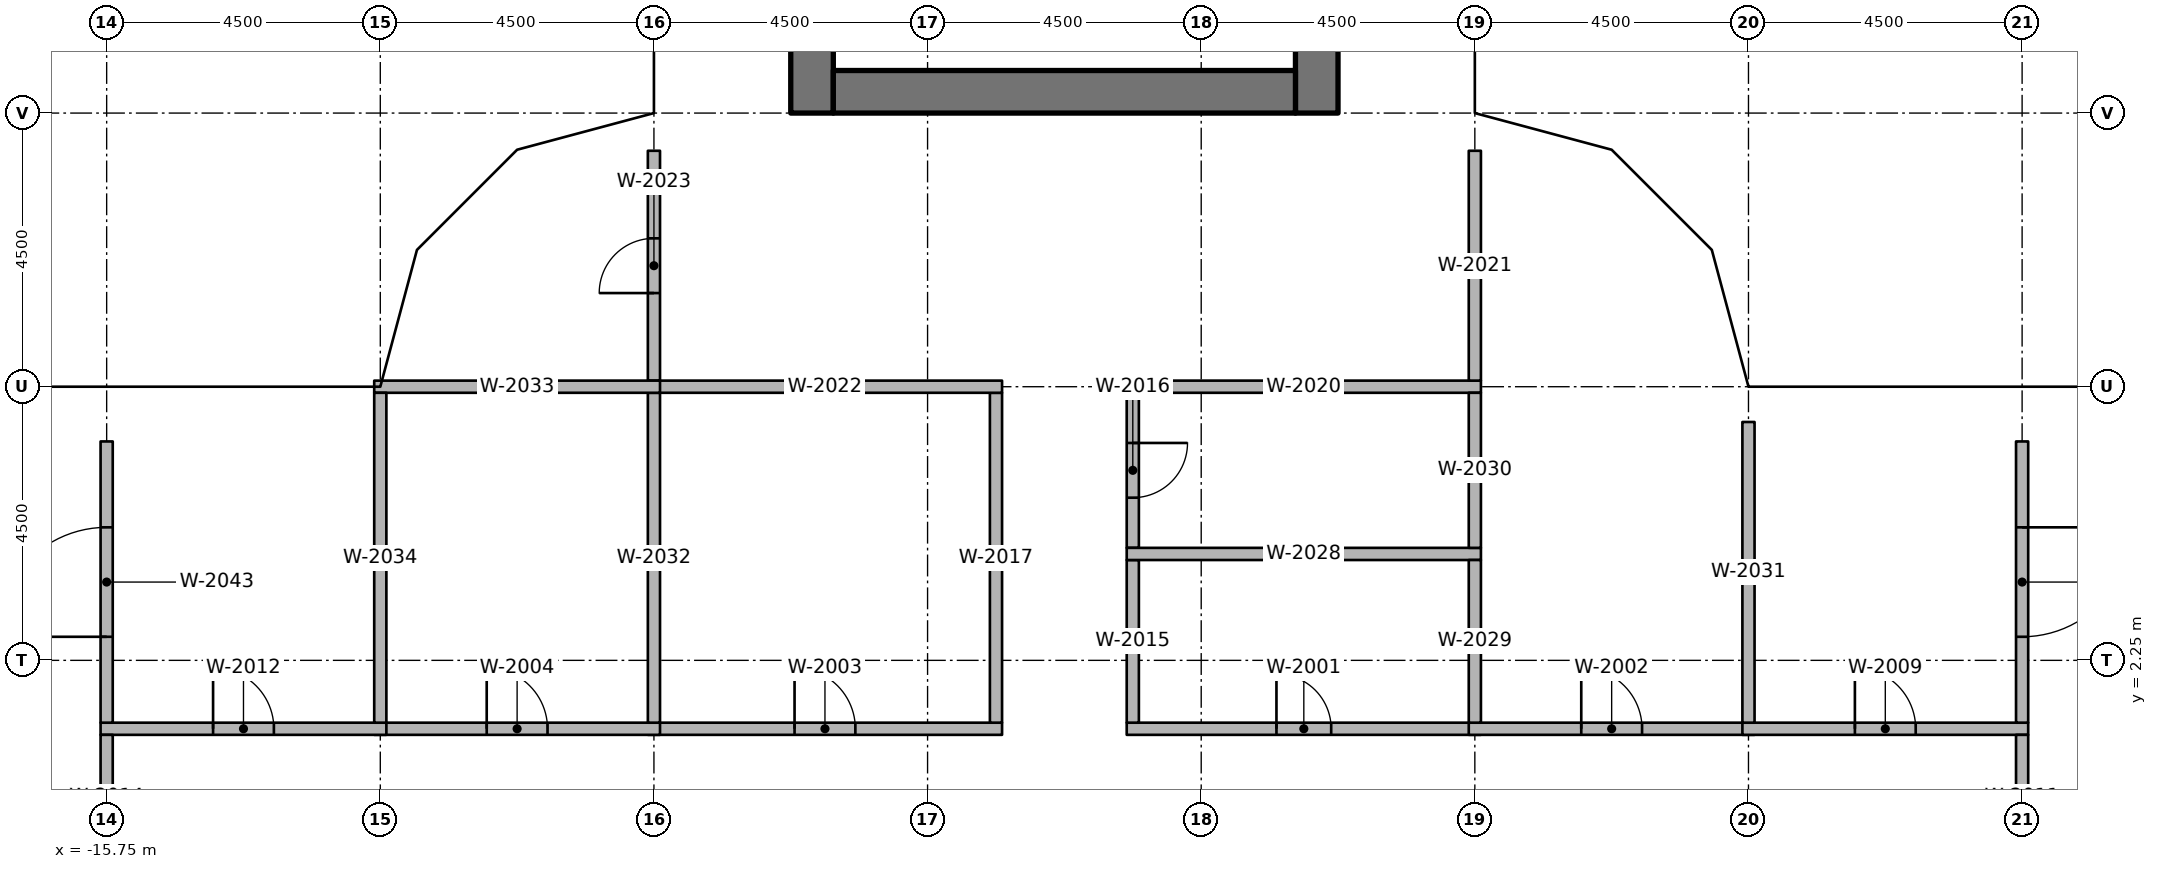
"""IFC4 building model, lengths in metres.
Left out: names, types, materials, properties, quantities, classifications, styles, units other than length and angle.
Written with IfcOpenShell. Run it as: python <this file> out.ifc"""

import sys

from ifc_helpers import new_model, si_unit, direction, frame, frame_2d, origin, origin_2d, place, context, subcontext, project, spatial, rectangle, extrude, element, fill, save


model = new_model("IFC4")
c1 = context("Model", 3, precision=1e-05, world=origin(), true_north=direction((0.0, 1.0)))
c2 = subcontext(c1, "Body", "Model", "MODEL_VIEW")
j1 = project(units=[si_unit("LENGTHUNIT", "METRE"), si_unit("PLANEANGLEUNIT", "RADIAN")], contexts=[c1])
p1 = place(None, origin())
s1 = spatial("IfcSite", under=j1, at=p1, CompositionType="ELEMENT")
p2 = place(p1, origin())
s2 = spatial("IfcBuilding", under=s1, at=p2, CompositionType="ELEMENT")
p3 = place(p2, frame((0.0, 0.0, 186.6)))
s3 = spatial("IfcBuildingStorey", under=s2, at=p3, CompositionType="ELEMENT", Elevation=186.6)
for number, where, z_axis, x_axis in (
    (1, (-15.75, 6.25, 0.0), (0.0, 0.0, 1.0), (1.0, 0.0, 0.0)),
    (2, (-10.75, 6.25, 0.0), (0.0, 0.0, 1.0), (1.0, 0.0, 0.0)),
    (3, (-6.25, 6.25, 0.0), (0.0, 0.0, 1.0), (1.0, 0.0, 0.0)),
    (4, (-6.25, 10.75, 0.0), (0.0, 0.0, 1.0), (1.0, 0.0, 0.0)),
    (5, (6.25, 6.25, 0.0), (0.0, 0.0, 1.0), (1.0, 0.0, 0.0)),
    (6, (6.25, 10.75, 0.0), (0.0, 0.0, 1.0), (1.0, 0.0, 0.0)),
    (7, (10.75, 6.25, 0.0), (0.0, 0.0, 1.0), (1.0, 0.0, 0.0)),
    (8, (15.75, 6.25, 0.0), (0.0, 0.0, 1.0), (1.0, 0.0, 0.0)),
):
    element("IfcColumn", number, at=place(p3, frame(where, z_axis=z_axis, x_axis=x_axis)), inside=s3, PredefinedType="COLUMN", context=c2, shape_type="SweptSolid", body=[
        extrude(rectangle(XDim=0.8, YDim=0.8, at=origin_2d()), origin(), (0.0, 0.0, 1.0), 3.65),
    ])
p4 = place(p3, frame((-4.15, 11.25, 0.0), z_axis=(0.0, 0.0, 1.0), x_axis=(0.0, 1.0, 0.0)))
e9 = element("IfcWall", 9, at=p4, inside=s3, PredefinedType="SHEAR", context=c2, shape_type="SweptSolid", body=[
    extrude(rectangle(XDim=15.0, YDim=0.7, at=frame_2d((7.5, 0.0))), origin(), (0.0, 0.0, 1.0), 3.8),
])
p5 = place(p4, frame((7.15, 0.0, 0.0)))
e10 = element("IfcOpeningElement", 10, at=p5, cuts=e9, PredefinedType="OPENING", context=c2, shape_type="SweptSolid", body=[
    extrude(rectangle(XDim=1.5, YDim=2.3, at=frame_2d((0.75, 1.15))), frame((0.0, 0.36, 0.0), z_axis=(0.0, -1.0, 0.0), x_axis=(1.0, 0.0, 0.0)), (0.0, 0.0, 1.0), 0.72),
])
p6 = place(p4, frame((13.9, 0.0, 0.0)))
e11 = element("IfcOpeningElement", 11, at=p6, cuts=e9, PredefinedType="OPENING", context=c2, shape_type="SweptSolid", body=[
    extrude(rectangle(XDim=0.9, YDim=2.1, at=frame_2d((0.45, 1.05))), frame((0.0, 0.36, 0.0), z_axis=(0.0, -1.0, 0.0), x_axis=(1.0, 0.0, 0.0)), (0.0, 0.0, 1.0), 0.72),
])
p7 = place(p4, frame((1.15, 0.0, 0.0)))
e12 = element("IfcOpeningElement", 12, at=p7, cuts=e9, PredefinedType="OPENING", context=c2, shape_type="SweptSolid", body=[
    extrude(rectangle(XDim=1.2, YDim=2.1, at=frame_2d((0.6, 1.05))), frame((0.0, 0.36, 0.0), z_axis=(0.0, -1.0, 0.0), x_axis=(1.0, 0.0, 0.0)), (0.0, 0.0, 1.0), 0.72),
])
p8 = place(p3, frame((4.15, 11.25, 0.0), z_axis=(0.0, 0.0, 1.0), x_axis=(0.0, 1.0, 0.0)))
e13 = element("IfcWall", 13, at=p8, inside=s3, PredefinedType="SHEAR", context=c2, shape_type="SweptSolid", body=[
    extrude(rectangle(XDim=15.0, YDim=0.7, at=frame_2d((7.5, 0.0))), origin(), (0.0, 0.0, 1.0), 3.8),
])
p9 = place(p8, frame((7.15, 0.0, 0.0)))
e14 = element("IfcOpeningElement", 14, at=p9, cuts=e13, PredefinedType="OPENING", context=c2, shape_type="SweptSolid", body=[
    extrude(rectangle(XDim=1.5, YDim=2.3, at=frame_2d((0.75, 1.15))), frame((0.0, 0.36, 0.0), z_axis=(0.0, -1.0, 0.0), x_axis=(1.0, 0.0, 0.0)), (0.0, 0.0, 1.0), 0.72),
])
p10 = place(p8, frame((5.55, 0.0, 0.0)))
e15 = element("IfcOpeningElement", 15, at=p10, cuts=e13, PredefinedType="OPENING", context=c2, shape_type="SweptSolid", body=[
    extrude(rectangle(XDim=1.2, YDim=2.1, at=frame_2d((0.6, 1.05))), frame((0.0, 0.36, 0.0), z_axis=(0.0, -1.0, 0.0), x_axis=(1.0, 0.0, 0.0)), (0.0, 0.0, 1.0), 0.72),
])
p11 = place(p3, frame((-3.8, 11.6, 0.0), z_axis=(0.0, 0.0, 1.0), x_axis=(1.0, 0.0, 0.0)))
e16 = element("IfcWall", 16, at=p11, inside=s3, PredefinedType="SHEAR", context=c2, shape_type="SweptSolid", body=[
    extrude(rectangle(XDim=7.6, YDim=0.7, at=frame_2d((3.8, 0.0))), origin(), (0.0, 0.0, 1.0), 3.8),
])
p12 = place(p3, frame((1.025, 1.125, 0.0), z_axis=(0.0, 0.0, 1.0), x_axis=(1.0, 0.0, 0.0)))
e17 = element("IfcWall", 17, at=p12, inside=s3, PredefinedType="PARTITIONING", context=c2, shape_type="SweptSolid", body=[
    extrude(rectangle(XDim=5.825, YDim=0.2, at=frame_2d((2.913, 0.0))), origin(), (0.0, 0.0, 1.0), 2.746),
])
p13 = place(p12, frame((2.462, 0.0, 0.0)))
e18 = element("IfcOpeningElement", 18, at=p13, cuts=e17, PredefinedType="OPENING", context=c2, shape_type="SweptSolid", body=[
    extrude(rectangle(XDim=0.9, YDim=2.1, at=frame_2d((0.45, 1.05))), frame((0.0, 0.11, 0.0), z_axis=(0.0, -1.0, 0.0), x_axis=(1.0, 0.0, 0.0)), (0.0, 0.0, 1.0), 0.22),
])
p14 = place(p3, frame((6.65, 1.125, 0.0), z_axis=(0.0, 0.0, 1.0), x_axis=(1.0, 0.0, 0.0)))
e19 = element("IfcWall", 19, at=p14, inside=s3, PredefinedType="PARTITIONING", context=c2, shape_type="SweptSolid", body=[
    extrude(rectangle(XDim=4.7, YDim=0.2, at=frame_2d((2.35, 0.0))), origin(), (0.0, 0.0, 1.0), 2.746),
])
p15 = place(p14, frame((1.85, 0.0, 0.0)))
e20 = element("IfcOpeningElement", 20, at=p15, cuts=e19, PredefinedType="OPENING", context=c2, shape_type="SweptSolid", body=[
    extrude(rectangle(XDim=1.0, YDim=2.1, at=frame_2d((0.5, 1.05))), frame((0.0, 0.11, 0.0), z_axis=(0.0, -1.0, 0.0), x_axis=(1.0, 0.0, 0.0)), (0.0, 0.0, 1.0), 0.22),
])
p16 = place(p3, frame((-6.85, 1.125, 0.0), z_axis=(0.0, 0.0, 1.0), x_axis=(1.0, 0.0, 0.0)))
e21 = element("IfcWall", 21, at=p16, inside=s3, PredefinedType="PARTITIONING", context=c2, shape_type="SweptSolid", body=[
    extrude(rectangle(XDim=5.825, YDim=0.2, at=frame_2d((2.913, 0.0))), origin(), (0.0, 0.0, 1.0), 2.746),
])
p17 = place(p16, frame((2.413, 0.0, 0.0)))
e22 = element("IfcOpeningElement", 22, at=p17, cuts=e21, PredefinedType="OPENING", context=c2, shape_type="SweptSolid", body=[
    extrude(rectangle(XDim=1.0, YDim=2.1, at=frame_2d((0.5, 1.05))), frame((0.0, 0.11, 0.0), z_axis=(0.0, -1.0, 0.0), x_axis=(1.0, 0.0, 0.0)), (0.0, 0.0, 1.0), 0.22),
])
p18 = place(p3, frame((-11.35, 1.125, 0.0), z_axis=(0.0, 0.0, 1.0), x_axis=(1.0, 0.0, 0.0)))
e23 = element("IfcWall", 23, at=p18, inside=s3, PredefinedType="PARTITIONING", context=c2, shape_type="SweptSolid", body=[
    extrude(rectangle(XDim=4.7, YDim=0.2, at=frame_2d((2.35, 0.0))), origin(), (0.0, 0.0, 1.0), 2.746),
])
p19 = place(p18, frame((1.85, 0.0, 0.0)))
e24 = element("IfcOpeningElement", 24, at=p19, cuts=e23, PredefinedType="OPENING", context=c2, shape_type="SweptSolid", body=[
    extrude(rectangle(XDim=1.0, YDim=2.1, at=frame_2d((0.5, 1.05))), frame((0.0, 0.11, 0.0), z_axis=(0.0, -1.0, 0.0), x_axis=(1.0, 0.0, 0.0)), (0.0, 0.0, 1.0), 0.22),
])
p20 = place(p3, frame((11.15, 1.125, 0.0), z_axis=(0.0, 0.0, 1.0), x_axis=(1.0, 0.0, 0.0)))
e25 = element("IfcWall", 25, at=p20, inside=s3, PredefinedType="PARTITIONING", context=c2, shape_type="SweptSolid", body=[
    extrude(rectangle(XDim=4.7, YDim=0.2, at=frame_2d((2.35, 0.0))), origin(), (0.0, 0.0, 1.0), 2.746),
])
p21 = place(p20, frame((1.85, 0.0, 0.0)))
e26 = element("IfcOpeningElement", 26, at=p21, cuts=e25, PredefinedType="OPENING", context=c2, shape_type="SweptSolid", body=[
    extrude(rectangle(XDim=1.0, YDim=2.1, at=frame_2d((0.5, 1.05))), frame((0.0, 0.11, 0.0), z_axis=(0.0, -1.0, 0.0), x_axis=(1.0, 0.0, 0.0)), (0.0, 0.0, 1.0), 0.22),
])
p22 = place(p3, frame((15.75, -1.025, 0.0), z_axis=(0.0, 0.0, 1.0), x_axis=(0.0, 1.0, 0.0)))
e27 = element("IfcWall", 27, at=p22, inside=s3, PredefinedType="PARTITIONING", context=c2, shape_type="SweptSolid", body=[
    extrude(rectangle(XDim=2.05, YDim=0.2, at=frame_2d((1.025, 0.0))), origin(), (0.0, 0.0, 1.0), 2.746),
])
p23 = place(p3, frame((-15.85, 1.125, 0.0), z_axis=(0.0, 0.0, 1.0), x_axis=(1.0, 0.0, 0.0)))
e28 = element("IfcWall", 28, at=p23, inside=s3, PredefinedType="PARTITIONING", context=c2, shape_type="SweptSolid", body=[
    extrude(rectangle(XDim=4.7, YDim=0.2, at=frame_2d((2.35, 0.0))), origin(), (0.0, 0.0, 1.0), 2.746),
])
p24 = place(p23, frame((1.85, 0.0, 0.0)))
e29 = element("IfcOpeningElement", 29, at=p24, cuts=e28, PredefinedType="OPENING", context=c2, shape_type="SweptSolid", body=[
    extrude(rectangle(XDim=1.0, YDim=2.1, at=frame_2d((0.5, 1.05))), frame((0.0, 0.11, 0.0), z_axis=(0.0, -1.0, 0.0), x_axis=(1.0, 0.0, 0.0)), (0.0, 0.0, 1.0), 0.22),
])
p25 = place(p3, frame((-15.75, -1.025, 0.0), z_axis=(0.0, 0.0, 1.0), x_axis=(0.0, 1.0, 0.0)))
e30 = element("IfcWall", 30, at=p25, inside=s3, PredefinedType="PARTITIONING", context=c2, shape_type="SweptSolid", body=[
    extrude(rectangle(XDim=2.05, YDim=0.2, at=frame_2d((1.025, 0.0))), origin(), (0.0, 0.0, 1.0), 2.746),
])
p26 = place(p3, frame((1.125, 1.225, 0.0), z_axis=(0.0, 0.0, 1.0), x_axis=(0.0, 1.0, 0.0)))
e31 = element("IfcWall", 31, at=p26, inside=s3, PredefinedType="PARTITIONING", context=c2, shape_type="SweptSolid", body=[
    extrude(rectangle(XDim=2.675, YDim=0.2, at=frame_2d((1.337, 0.0))), origin(), (0.0, 0.0, 1.0), 2.746),
])
p27 = place(p3, frame((1.125, 6.65, 0.0), z_axis=(0.0, 0.0, 1.0), x_axis=(0.0, -1.0, 0.0)))
e32 = element("IfcWall", 32, at=p27, inside=s3, PredefinedType="PARTITIONING", context=c2, shape_type="SweptSolid", body=[
    extrude(rectangle(XDim=2.55, YDim=0.2, at=frame_2d((1.275, 0.0))), origin(), (0.0, 0.0, 1.0), 2.746),
])
p28 = place(p27, frame((0.825, 0.0, 0.0)))
e33 = element("IfcOpeningElement", 33, at=p28, cuts=e32, PredefinedType="OPENING", context=c2, shape_type="SweptSolid", body=[
    extrude(rectangle(XDim=0.9, YDim=2.1, at=frame_2d((0.45, 1.05))), frame((0.0, 0.11, 0.0), z_axis=(0.0, -1.0, 0.0), x_axis=(1.0, 0.0, 0.0)), (0.0, 0.0, 1.0), 0.22),
])
p29 = place(p3, frame((-1.125, 1.225, 0.0), z_axis=(0.0, 0.0, 1.0), x_axis=(0.0, 1.0, 0.0)))
e34 = element("IfcWall", 34, at=p29, inside=s3, PredefinedType="PARTITIONING", context=c2, shape_type="SweptSolid", body=[
    extrude(rectangle(XDim=5.425, YDim=0.2, at=frame_2d((2.712, 0.0))), origin(), (0.0, 0.0, 1.0), 2.746),
])
p30 = place(p3, frame((1.025, 6.75, 0.0), z_axis=(0.0, 0.0, 1.0), x_axis=(1.0, 0.0, 0.0)))
e35 = element("IfcWall", 35, at=p30, inside=s3, PredefinedType="PARTITIONING", context=c2, shape_type="SweptSolid", body=[
    extrude(rectangle(XDim=5.825, YDim=0.2, at=frame_2d((2.913, 0.0))), origin(), (0.0, 0.0, 1.0), 2.746),
])
p31 = place(p3, frame((6.75, 6.85, 0.0), z_axis=(0.0, 0.0, 1.0), x_axis=(0.0, 1.0, 0.0)))
e36 = element("IfcWall", 36, at=p31, inside=s3, PredefinedType="PARTITIONING", context=c2, shape_type="SweptSolid", body=[
    extrude(rectangle(XDim=3.78, YDim=0.2, at=frame_2d((1.89, 0.0))), origin(), (0.0, 0.0, 1.0), 2.746),
])
p32 = place(p3, frame((-6.85, 6.75, 0.0), z_axis=(0.0, 0.0, 1.0), x_axis=(1.0, 0.0, 0.0)))
e37 = element("IfcWall", 37, at=p32, inside=s3, PredefinedType="PARTITIONING", context=c2, shape_type="SweptSolid", body=[
    extrude(rectangle(XDim=5.825, YDim=0.2, at=frame_2d((2.913, 0.0))), origin(), (0.0, 0.0, 1.0), 2.746),
])
p33 = place(p3, frame((-6.75, 6.85, 0.0), z_axis=(0.0, 0.0, 1.0), x_axis=(0.0, 1.0, 0.0)))
e38 = element("IfcWall", 38, at=p33, inside=s3, PredefinedType="PARTITIONING", context=c2, shape_type="SweptSolid", body=[
    extrude(rectangle(XDim=3.78, YDim=0.2, at=frame_2d((1.89, 0.0))), origin(), (0.0, 0.0, 1.0), 2.746),
])
p34 = place(p33, frame((1.44, 0.0, 0.0)))
e39 = element("IfcOpeningElement", 39, at=p34, cuts=e38, PredefinedType="OPENING", context=c2, shape_type="SweptSolid", body=[
    extrude(rectangle(XDim=0.9, YDim=2.1, at=frame_2d((0.45, 1.05))), frame((0.0, 0.11, 0.0), z_axis=(0.0, -1.0, 0.0), x_axis=(1.0, 0.0, 0.0)), (0.0, 0.0, 1.0), 0.22),
])
p35 = place(p3, frame((1.025, 4.0, 0.0), z_axis=(0.0, 0.0, 1.0), x_axis=(1.0, 0.0, 0.0)))
e40 = element("IfcWall", 40, at=p35, inside=s3, PredefinedType="PARTITIONING", context=c2, shape_type="SweptSolid", body=[
    extrude(rectangle(XDim=5.825, YDim=0.2, at=frame_2d((2.913, 0.0))), origin(), (0.0, 0.0, 1.0), 2.746),
])
p36 = place(p3, frame((6.75, 1.225, 0.0), z_axis=(0.0, 0.0, 1.0), x_axis=(0.0, 1.0, 0.0)))
e41 = element("IfcWall", 41, at=p36, inside=s3, PredefinedType="PARTITIONING", context=c2, shape_type="SweptSolid", body=[
    extrude(rectangle(XDim=2.675, YDim=0.2, at=frame_2d((1.337, 0.0))), origin(), (0.0, 0.0, 1.0), 2.746),
])
p37 = place(p3, frame((6.75, 4.1, 0.0), z_axis=(0.0, 0.0, 1.0), x_axis=(0.0, 1.0, 0.0)))
e42 = element("IfcWall", 42, at=p37, inside=s3, PredefinedType="PARTITIONING", context=c2, shape_type="SweptSolid", body=[
    extrude(rectangle(XDim=2.55, YDim=0.2, at=frame_2d((1.275, 0.0))), origin(), (0.0, 0.0, 1.0), 2.746),
])
p38 = place(p3, frame((11.25, 1.225, 0.0), z_axis=(0.0, 0.0, 1.0), x_axis=(0.0, 1.0, 0.0)))
e43 = element("IfcWall", 43, at=p38, inside=s3, PredefinedType="PARTITIONING", context=c2, shape_type="SweptSolid", body=[
    extrude(rectangle(XDim=4.945, YDim=0.2, at=frame_2d((2.472, 0.0))), origin(), (0.0, 0.0, 1.0), 2.746),
])
p39 = place(p3, frame((-6.75, 1.225, 0.0), z_axis=(0.0, 0.0, 1.0), x_axis=(0.0, 1.0, 0.0)))
e44 = element("IfcWall", 44, at=p39, inside=s3, PredefinedType="PARTITIONING", context=c2, shape_type="SweptSolid", body=[
    extrude(rectangle(XDim=5.425, YDim=0.2, at=frame_2d((2.712, 0.0))), origin(), (0.0, 0.0, 1.0), 2.746),
])
p40 = place(p3, frame((-11.35, 6.75, 0.0), z_axis=(0.0, 0.0, 1.0), x_axis=(1.0, 0.0, 0.0)))
e45 = element("IfcWall", 45, at=p40, inside=s3, PredefinedType="PARTITIONING", context=c2, shape_type="SweptSolid", body=[
    extrude(rectangle(XDim=4.7, YDim=0.2, at=frame_2d((2.35, 0.0))), origin(), (0.0, 0.0, 1.0), 2.746),
])
p41 = place(p3, frame((-11.25, 1.225, 0.0), z_axis=(0.0, 0.0, 1.0), x_axis=(0.0, 1.0, 0.0)))
e46 = element("IfcWall", 46, at=p41, inside=s3, PredefinedType="PARTITIONING", context=c2, shape_type="SweptSolid", body=[
    extrude(rectangle(XDim=5.425, YDim=0.2, at=frame_2d((2.712, 0.0))), origin(), (0.0, 0.0, 1.0), 2.746),
])
p42 = place(p3, frame((15.75, 5.85, 0.0), z_axis=(0.0, 0.0, 1.0), x_axis=(0.0, -1.0, 0.0)))
e47 = element("IfcWall", 47, at=p42, inside=s3, PredefinedType="PARTITIONING", context=c2, shape_type="SweptSolid", body=[
    extrude(rectangle(XDim=4.625, YDim=0.2, at=frame_2d((2.312, 0.0))), origin(), (0.0, 0.0, 1.0), 2.746),
])
p43 = place(p42, frame((1.413, 0.0, 0.0)))
e48 = element("IfcOpeningElement", 48, at=p43, cuts=e47, PredefinedType="OPENING", context=c2, shape_type="SweptSolid", body=[
    extrude(rectangle(XDim=1.8, YDim=2.1, at=frame_2d((0.9, 1.05))), frame((0.0, 0.11, 0.0), z_axis=(0.0, -1.0, 0.0), x_axis=(1.0, 0.0, 0.0)), (0.0, 0.0, 1.0), 0.22),
])
p44 = place(p3, frame((-15.75, 1.225, 0.0), z_axis=(0.0, 0.0, 1.0), x_axis=(0.0, 1.0, 0.0)))
e49 = element("IfcWall", 49, at=p44, inside=s3, PredefinedType="PARTITIONING", context=c2, shape_type="SweptSolid", body=[
    extrude(rectangle(XDim=4.625, YDim=0.2, at=frame_2d((2.312, 0.0))), origin(), (0.0, 0.0, 1.0), 2.746),
])
p45 = place(p44, frame((1.413, 0.0, 0.0)))
e50 = element("IfcOpeningElement", 50, at=p45, cuts=e49, PredefinedType="OPENING", context=c2, shape_type="SweptSolid", body=[
    extrude(rectangle(XDim=1.8, YDim=2.1, at=frame_2d((0.9, 1.05))), frame((0.0, 0.11, 0.0), z_axis=(0.0, -1.0, 0.0), x_axis=(1.0, 0.0, 0.0)), (0.0, 0.0, 1.0), 0.22),
])
p46 = place(p43, origin())
e51 = element("IfcDoor", 51, at=p46, inside=s3, OperationType="DOUBLE_DOOR_SINGLE_SWING", PredefinedType="DOOR", context=c2, shape_type="SweptSolid", body=[
    extrude(rectangle(XDim=1.8, YDim=2.1, at=frame_2d((0.9, 1.05))), frame((0.0, 0.025, 0.0), z_axis=(0.0, -1.0, 0.0), x_axis=(1.0, 0.0, 0.0)), (0.0, 0.0, 1.0), 0.05),
])
fill(e48, e51)
p47 = place(p21, origin())
e52 = element("IfcDoor", 52, at=p47, inside=s3, OperationType="SINGLE_SWING_RIGHT", PredefinedType="DOOR", context=c2, shape_type="SweptSolid", body=[
    extrude(rectangle(XDim=1.0, YDim=2.1, at=frame_2d((0.5, 1.05))), frame((0.0, 0.025, 0.0), z_axis=(0.0, -1.0, 0.0), x_axis=(1.0, 0.0, 0.0)), (0.0, 0.0, 1.0), 0.05),
])
fill(e26, e52)
p48 = place(p13, origin())
e53 = element("IfcDoor", 53, at=p48, inside=s3, OperationType="SINGLE_SWING_RIGHT", PredefinedType="DOOR", context=c2, shape_type="SweptSolid", body=[
    extrude(rectangle(XDim=0.9, YDim=2.1, at=frame_2d((0.45, 1.05))), frame((0.0, 0.025, 0.0), z_axis=(0.0, -1.0, 0.0), x_axis=(1.0, 0.0, 0.0)), (0.0, 0.0, 1.0), 0.05),
])
fill(e18, e53)
p49 = place(p28, origin())
e54 = element("IfcDoor", 54, at=p49, inside=s3, OperationType="SINGLE_SWING_RIGHT", PredefinedType="DOOR", context=c2, shape_type="SweptSolid", body=[
    extrude(rectangle(XDim=0.9, YDim=2.1, at=frame_2d((0.45, 1.05))), frame((0.0, 0.025, 0.0), z_axis=(0.0, -1.0, 0.0), x_axis=(1.0, 0.0, 0.0)), (0.0, 0.0, 1.0), 0.05),
])
fill(e33, e54)
p50 = place(p15, origin())
e55 = element("IfcDoor", 55, at=p50, inside=s3, OperationType="SINGLE_SWING_RIGHT", PredefinedType="DOOR", context=c2, shape_type="SweptSolid", body=[
    extrude(rectangle(XDim=1.0, YDim=2.1, at=frame_2d((0.5, 1.05))), frame((0.0, 0.025, 0.0), z_axis=(0.0, -1.0, 0.0), x_axis=(1.0, 0.0, 0.0)), (0.0, 0.0, 1.0), 0.05),
])
fill(e20, e55)
p51 = place(p17, origin())
e56 = element("IfcDoor", 56, at=p51, inside=s3, OperationType="SINGLE_SWING_RIGHT", PredefinedType="DOOR", context=c2, shape_type="SweptSolid", body=[
    extrude(rectangle(XDim=1.0, YDim=2.1, at=frame_2d((0.5, 1.05))), frame((0.0, 0.025, 0.0), z_axis=(0.0, -1.0, 0.0), x_axis=(1.0, 0.0, 0.0)), (0.0, 0.0, 1.0), 0.05),
])
fill(e22, e56)
p52 = place(p19, origin())
e57 = element("IfcDoor", 57, at=p52, inside=s3, OperationType="SINGLE_SWING_RIGHT", PredefinedType="DOOR", context=c2, shape_type="SweptSolid", body=[
    extrude(rectangle(XDim=1.0, YDim=2.1, at=frame_2d((0.5, 1.05))), frame((0.0, 0.025, 0.0), z_axis=(0.0, -1.0, 0.0), x_axis=(1.0, 0.0, 0.0)), (0.0, 0.0, 1.0), 0.05),
])
fill(e24, e57)
p53 = place(p34, origin())
e58 = element("IfcDoor", 58, at=p53, inside=s3, OperationType="SINGLE_SWING_LEFT", PredefinedType="DOOR", context=c2, shape_type="SweptSolid", body=[
    extrude(rectangle(XDim=0.9, YDim=2.1, at=frame_2d((0.45, 1.05))), frame((0.0, 0.025, 0.0), z_axis=(0.0, -1.0, 0.0), x_axis=(1.0, 0.0, 0.0)), (0.0, 0.0, 1.0), 0.05),
])
fill(e39, e58)
p54 = place(p45, origin())
e59 = element("IfcDoor", 59, at=p54, inside=s3, OperationType="DOUBLE_DOOR_SINGLE_SWING", PredefinedType="DOOR", context=c2, shape_type="SweptSolid", body=[
    extrude(rectangle(XDim=1.8, YDim=2.1, at=frame_2d((0.9, 1.05))), frame((0.0, 0.025, 0.0), z_axis=(0.0, -1.0, 0.0), x_axis=(1.0, 0.0, 0.0)), (0.0, 0.0, 1.0), 0.05),
])
fill(e50, e59)
p55 = place(p24, origin())
e60 = element("IfcDoor", 60, at=p55, inside=s3, OperationType="SINGLE_SWING_RIGHT", PredefinedType="DOOR", context=c2, shape_type="SweptSolid", body=[
    extrude(rectangle(XDim=1.0, YDim=2.1, at=frame_2d((0.5, 1.05))), frame((0.0, 0.025, 0.0), z_axis=(0.0, -1.0, 0.0), x_axis=(1.0, 0.0, 0.0)), (0.0, 0.0, 1.0), 0.05),
])
fill(e29, e60)
save(model, sys.argv[1])
